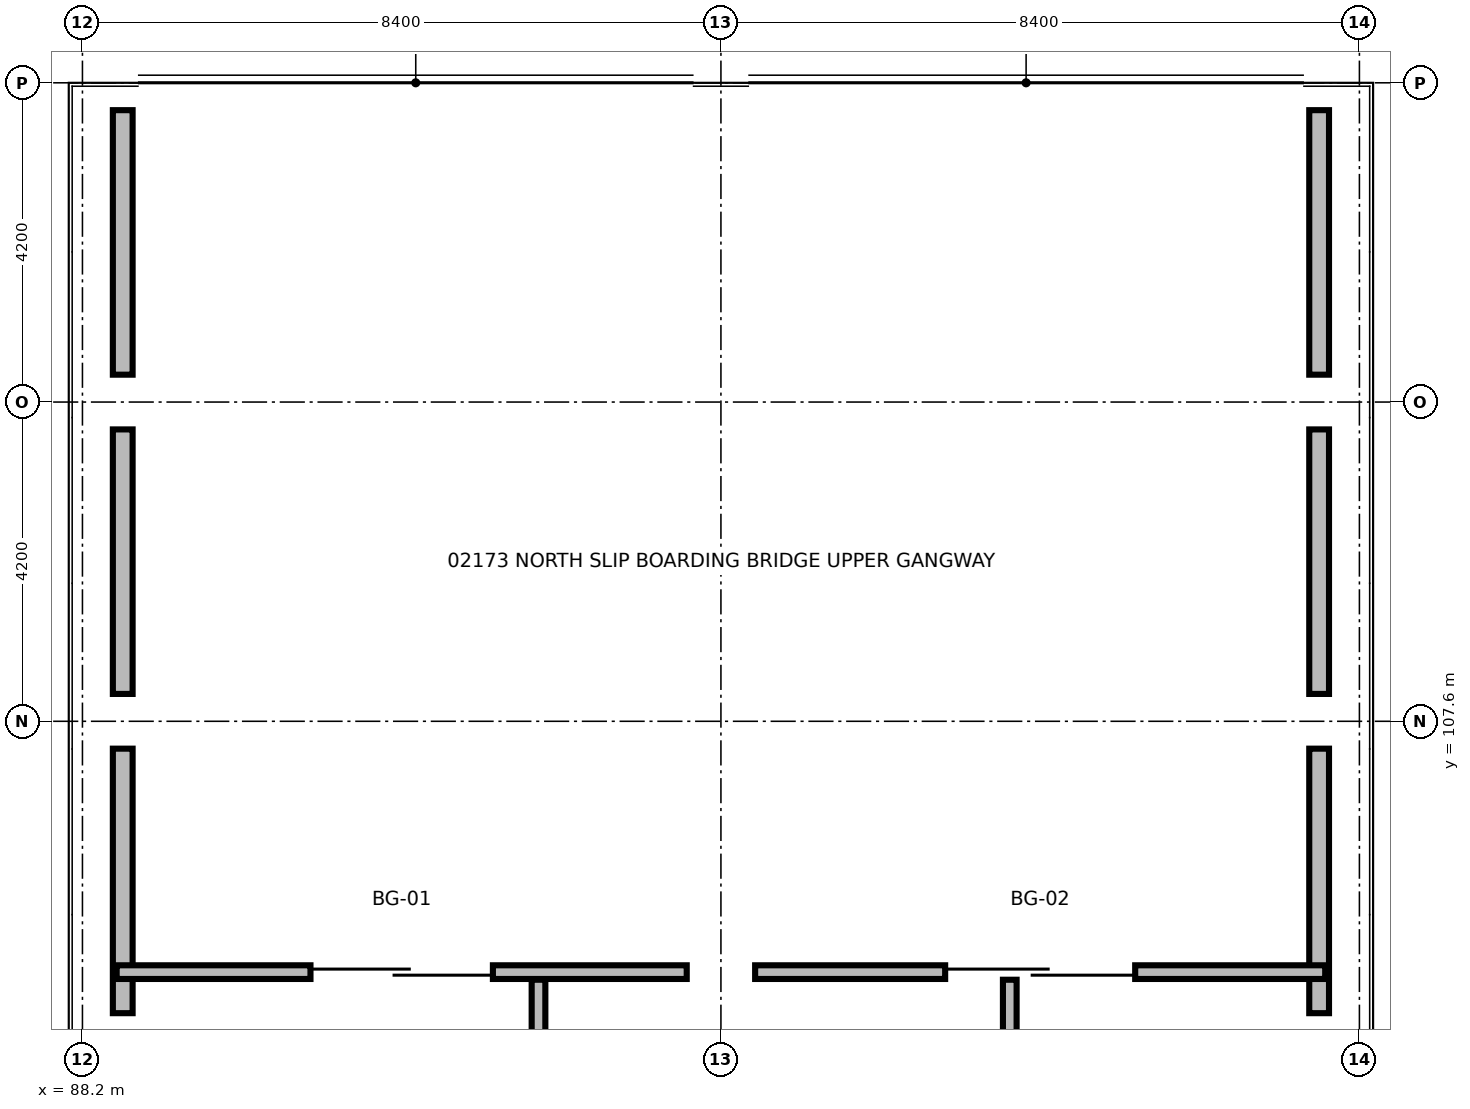
"""IFC4 building model, lengths in metres.
Left out: names, types, materials, properties, quantities, classifications, styles, units other than length and angle.
Written with IfcOpenShell. Run it as: python <this file> out.ifc"""

import sys

from ifc_helpers import new_model, si_unit, direction, frame, frame_2d, origin, place, context, subcontext, project, spatial, rectangle, extrude, element, fill, save


model = new_model("IFC4")
c1 = context("Model", 3, precision=1e-05, world=origin(), true_north=direction((0.0, 1.0)))
c2 = subcontext(c1, "Body", "Model", "MODEL_VIEW")
j1 = project(units=[si_unit("LENGTHUNIT", "METRE"), si_unit("PLANEANGLEUNIT", "RADIAN")], contexts=[c1])
p1 = place(None, origin())
s1 = spatial("IfcSite", under=j1, at=p1, CompositionType="ELEMENT")
p2 = place(p1, origin())
s2 = spatial("IfcBuilding", under=s1, at=p2, CompositionType="ELEMENT")
p3 = place(p2, frame((0.0, 0.0, 9.6)))
s3 = spatial("IfcBuildingStorey", under=s2, at=p3, CompositionType="ELEMENT", Elevation=9.6)
for number, where, z_axis, x_axis in (
    (1, (88.73, 103.76, 0.0), (0.0, 0.0, 1.0), (0.0, 1.0, 0.0)),
    (2, (104.47, 107.24, 0.0), (0.0, 0.0, 1.0), (0.0, -1.0, 0.0)),
    (3, (88.73, 107.96, 0.0), (0.0, 0.0, 1.0), (0.0, 1.0, 0.0)),
    (4, (104.47, 111.44, 0.0), (0.0, 0.0, 1.0), (0.0, -1.0, 0.0)),
    (5, (88.73, 112.16, 0.0), (0.0, 0.0, 1.0), (0.0, 1.0, 0.0)),
    (6, (104.47, 115.64, 0.0), (0.0, 0.0, 1.0), (0.0, -1.0, 0.0)),
):
    element("IfcWall", number, at=place(p3, frame(where, z_axis=z_axis, x_axis=x_axis)), inside=s3, PredefinedType="SOLIDWALL", context=c2, shape_type="SweptSolid", body=[
        extrude(rectangle(XDim=3.48, YDim=0.26, at=frame_2d((1.74, 0.0))), origin(), (0.0, 0.0, 1.0), 3.084),
    ])
p4 = place(p3, frame((88.65, 104.3, 0.0), z_axis=(0.0, 0.0, 1.0), x_axis=(1.0, 0.0, 0.0)))
e7 = element("IfcWall", 7, at=p4, inside=s3, PredefinedType="PARTITIONING", context=c2, shape_type="SweptSolid", body=[
    extrude(rectangle(XDim=7.5, YDim=0.18, at=frame_2d((3.75, 0.0))), origin(), (0.0, 0.0, 1.0), 3.084),
])
p5 = place(p4, frame((2.55, 0.0, 0.0)))
e8 = element("IfcOpeningElement", 8, at=p5, cuts=e7, PredefinedType="OPENING", context=c2, shape_type="SweptSolid", body=[
    extrude(rectangle(XDim=2.4, YDim=2.5, at=frame_2d((1.2, 1.25))), frame((0.0, 0.1, 0.0), z_axis=(0.0, -1.0, 0.0), x_axis=(1.0, 0.0, 0.0)), (0.0, 0.0, 1.0), 0.2),
])
p6 = place(p3, frame((97.05, 104.3, 0.0), z_axis=(0.0, 0.0, 1.0), x_axis=(1.0, 0.0, 0.0)))
e9 = element("IfcWall", 9, at=p6, inside=s3, PredefinedType="PARTITIONING", context=c2, shape_type="SweptSolid", body=[
    extrude(rectangle(XDim=7.5, YDim=0.18, at=frame_2d((3.75, 0.0))), origin(), (0.0, 0.0, 1.0), 3.084),
])
p7 = place(p6, frame((2.5, 0.0, 0.0)))
e10 = element("IfcOpeningElement", 10, at=p7, cuts=e9, PredefinedType="OPENING", context=c2, shape_type="SweptSolid", body=[
    extrude(rectangle(XDim=2.5, YDim=2.5, at=frame_2d((1.25, 1.25))), frame((0.0, 0.1, 0.0), z_axis=(0.0, -1.0, 0.0), x_axis=(1.0, 0.0, 0.0)), (0.0, 0.0, 1.0), 0.2),
])
p8 = place(p3, frame((94.2, 60.6, 0.0), z_axis=(0.0, 0.0, 1.0), x_axis=(0.0, 1.0, 0.0)))
e11 = element("IfcWall", 11, at=p8, inside=s3, PredefinedType="PARTITIONING", context=c2, shape_type="SweptSolid", body=[
    extrude(rectangle(XDim=43.6, YDim=0.18, at=frame_2d((21.8, 0.0))), origin(), (0.0, 0.0, 1.0), 2.54),
])
p9 = place(p8, frame((12.155, 0.0, 0.0)))
e12 = element("IfcOpeningElement", 12, at=p9, cuts=e11, PredefinedType="OPENING", context=c2, shape_type="SweptSolid", body=[
    extrude(rectangle(XDim=1.85, YDim=2.3, at=frame_2d((0.925, 1.15))), frame((0.0, 0.1, 0.0), z_axis=(0.0, -1.0, 0.0), x_axis=(1.0, 0.0, 0.0)), (0.0, 0.0, 1.0), 0.2),
])
p10 = place(p8, frame((33.083, 0.0, 0.0)))
e13 = element("IfcOpeningElement", 13, at=p10, cuts=e11, PredefinedType="OPENING", context=c2, shape_type="SweptSolid", body=[
    extrude(rectangle(XDim=1.85, YDim=2.3, at=frame_2d((0.925, 1.15))), frame((0.0, 0.1, 0.0), z_axis=(0.0, -1.0, 0.0), x_axis=(1.0, 0.0, 0.0)), (0.0, 0.0, 1.0), 0.2),
])
p11 = place(p3, frame((100.4, 60.6, 0.0), z_axis=(0.0, 0.0, 1.0), x_axis=(0.0, 1.0, 0.0)))
e14 = element("IfcWall", 14, at=p11, inside=s3, PredefinedType="PARTITIONING", context=c2, shape_type="SweptSolid", body=[
    extrude(rectangle(XDim=43.6, YDim=0.18, at=frame_2d((21.8, 0.0))), origin(), (0.0, 0.0, 1.0), 2.54),
])
p12 = place(p11, frame((12.155, 0.0, 0.0)))
e15 = element("IfcOpeningElement", 15, at=p12, cuts=e14, PredefinedType="OPENING", context=c2, shape_type="SweptSolid", body=[
    extrude(rectangle(XDim=1.85, YDim=2.3, at=frame_2d((0.925, 1.15))), frame((0.0, 0.1, 0.0), z_axis=(0.0, -1.0, 0.0), x_axis=(1.0, 0.0, 0.0)), (0.0, 0.0, 1.0), 0.2),
])
p13 = place(p11, frame((33.083, 0.0, 0.0)))
e16 = element("IfcOpeningElement", 16, at=p13, cuts=e14, PredefinedType="OPENING", context=c2, shape_type="SweptSolid", body=[
    extrude(rectangle(XDim=1.85, YDim=2.3, at=frame_2d((0.925, 1.15))), frame((0.0, 0.1, 0.0), z_axis=(0.0, -1.0, 0.0), x_axis=(1.0, 0.0, 0.0)), (0.0, 0.0, 1.0), 0.2),
])
p14 = place(p5, origin())
e17 = element("IfcDoor", 17, at=p14, inside=s3, OperationType="DOUBLE_DOOR_SLIDING", PredefinedType="GATE", context=c2, shape_type="SweptSolid", body=[
    extrude(rectangle(XDim=2.4, YDim=2.5, at=frame_2d((1.2, 1.25))), frame((0.0, 0.025, 0.0), z_axis=(0.0, -1.0, 0.0), x_axis=(1.0, 0.0, 0.0)), (0.0, 0.0, 1.0), 0.05),
])
fill(e8, e17)
p15 = place(p7, origin())
e18 = element("IfcDoor", 18, at=p15, inside=s3, OperationType="DOUBLE_DOOR_SLIDING", PredefinedType="GATE", context=c2, shape_type="SweptSolid", body=[
    extrude(rectangle(XDim=2.5, YDim=2.5, at=frame_2d((1.25, 1.25))), frame((0.0, 0.025, 0.0), z_axis=(0.0, -1.0, 0.0), x_axis=(1.0, 0.0, 0.0)), (0.0, 0.0, 1.0), 0.05),
])
fill(e10, e18)
save(model, sys.argv[1])
